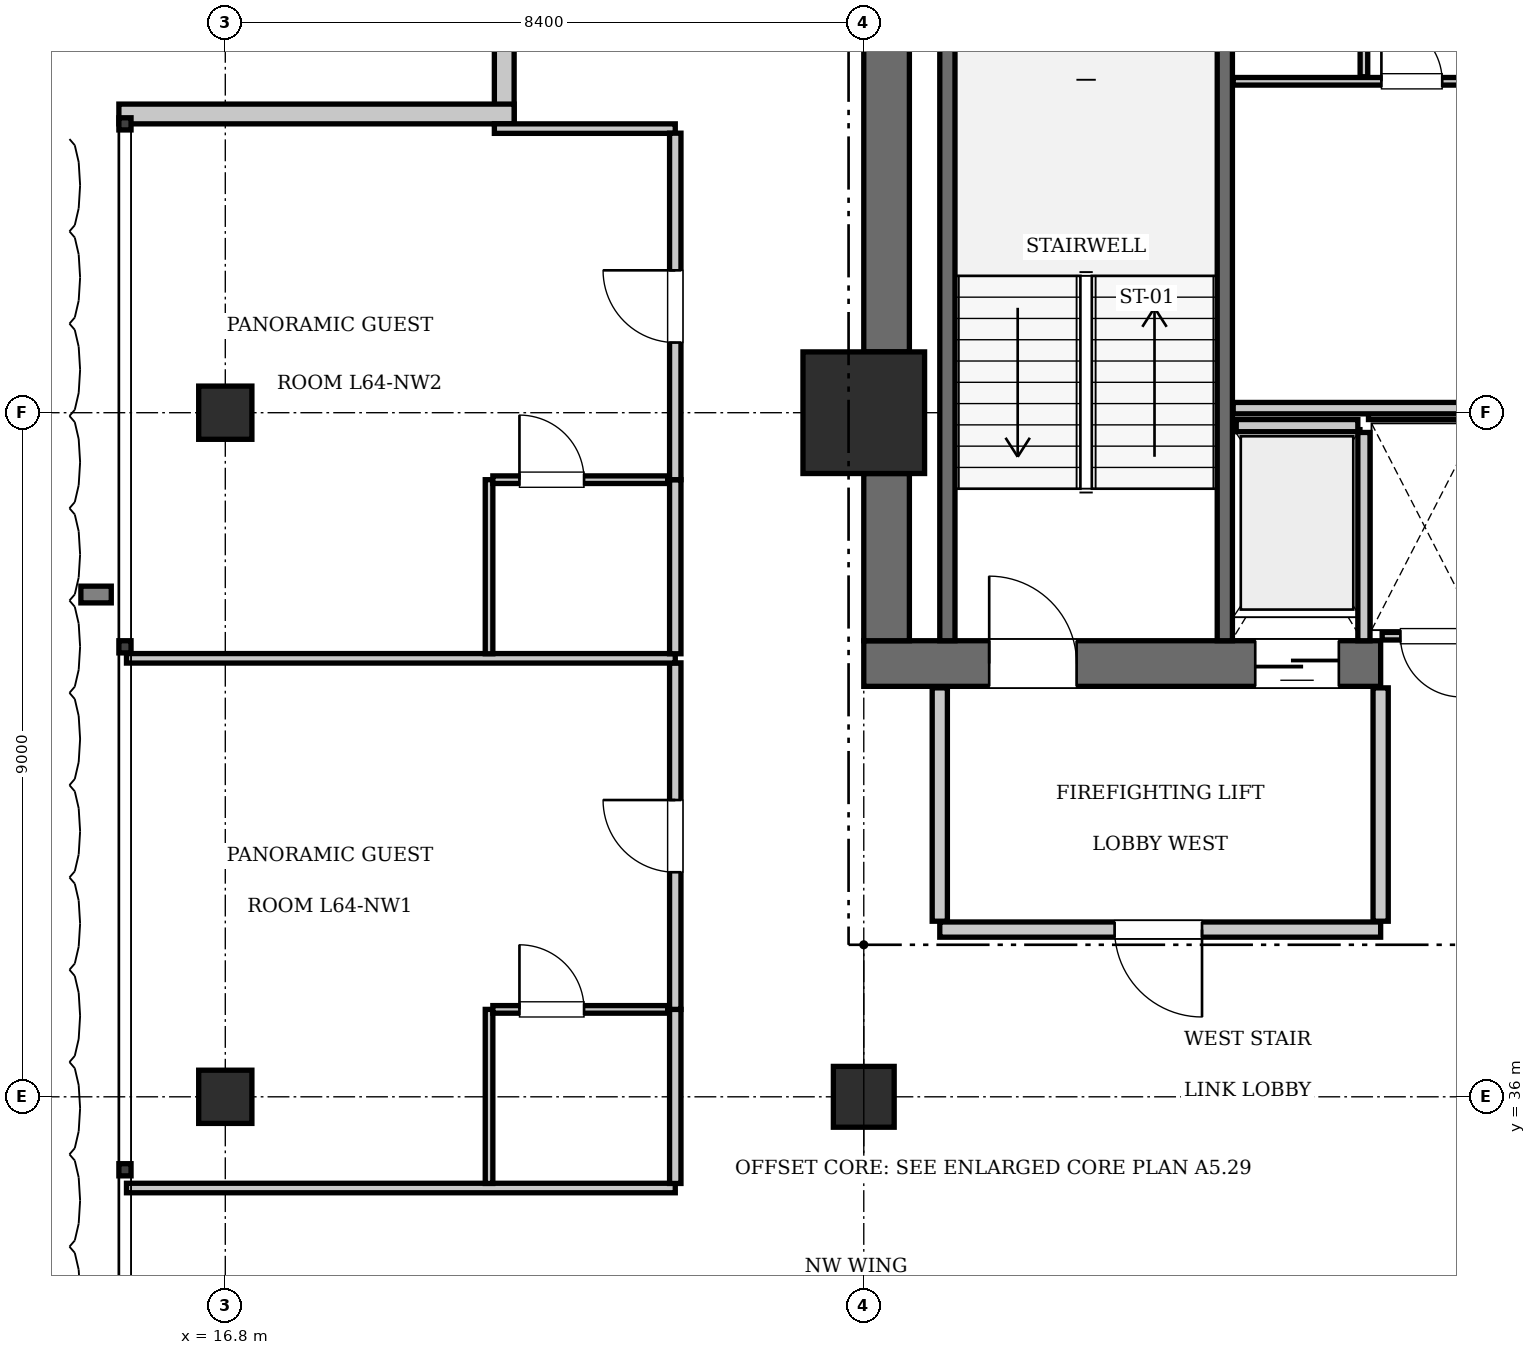
"""IFC4 building model, lengths in metres.
Left out: names, types, materials, properties, quantities, classifications, styles, units other than length and angle.
Written with IfcOpenShell. Run it as: python <this file> out.ifc"""

import sys

from ifc_helpers import new_model, si_unit, direction, frame, frame_2d, origin, origin_2d, place, context, subcontext, project, spatial, rectangle, extrude, element, fill, save


model = new_model("IFC4")
c1 = context("Model", 3, precision=1e-05, world=origin(), true_north=direction((0.0, 1.0)))
c2 = subcontext(c1, "Body", "Model", "MODEL_VIEW")
j1 = project(units=[si_unit("LENGTHUNIT", "METRE"), si_unit("PLANEANGLEUNIT", "RADIAN")], contexts=[c1])
p1 = place(None, origin())
s1 = spatial("IfcSite", under=j1, at=p1, CompositionType="ELEMENT")
p2 = place(p1, origin())
s2 = spatial("IfcBuilding", under=s1, at=p2, CompositionType="ELEMENT")
p3 = place(p2, frame((0.0, 0.0, 262.5)))
s3 = spatial("IfcBuildingStorey", under=s2, at=p3, CompositionType="ELEMENT", Elevation=262.5)
p4 = place(p3, frame((25.2, 45.0, 0.0), z_axis=(0.0, 0.0, 1.0), x_axis=(1.0, 0.0, 0.0)))
e1 = element("IfcColumn", 1, at=p4, inside=s3, PredefinedType="COLUMN", context=c2, shape_type="SweptSolid", body=[
    extrude(rectangle(XDim=1.6, YDim=1.6, at=origin_2d()), origin(), (0.0, 0.0, 1.0), 3.85),
])
p5 = place(p3, frame((25.2, 41.7, 0.0), z_axis=(0.0, 0.0, 1.0), x_axis=(1.0, 0.0, 0.0)))
e2 = element("IfcWall", 2, at=p5, inside=s3, PredefinedType="SHEAR", context=c2, shape_type="SweptSolid", body=[
    extrude(rectangle(XDim=6.8, YDim=0.6, at=frame_2d((3.4, 0.0))), origin(), (0.0, 0.0, 1.0), 3.85),
])
p6 = place(p5, frame((1.65, 0.0, 0.0)))
e3 = element("IfcOpeningElement", 3, at=p6, cuts=e2, PredefinedType="OPENING", context=c2, shape_type="SweptSolid", body=[
    extrude(rectangle(XDim=1.15, YDim=2.15, at=frame_2d((0.575, 1.075))), frame((0.0, 0.31, 0.0), z_axis=(0.0, -1.0, 0.0), x_axis=(1.0, 0.0, 0.0)), (0.0, 0.0, 1.0), 0.62),
])
p7 = place(p5, frame((5.15, 0.0, 0.0)))
e4 = element("IfcOpeningElement", 4, at=p7, cuts=e2, PredefinedType="OPENING", context=c2, shape_type="SweptSolid", body=[
    extrude(rectangle(XDim=1.1, YDim=2.2, at=frame_2d((0.55, 1.1))), frame((0.0, 0.31, 0.0), z_axis=(0.0, -1.0, 0.0), x_axis=(1.0, 0.0, 0.0)), (0.0, 0.0, 1.0), 0.62),
])
p8 = place(p3, frame((25.5, 42.0, 0.0), z_axis=(0.0, 0.0, 1.0), x_axis=(0.0, 1.0, 0.0)))
e5 = element("IfcWall", 5, at=p8, inside=s3, PredefinedType="SHEAR", context=c2, shape_type="SweptSolid", body=[
    extrude(rectangle(XDim=2.2, YDim=0.6, at=frame_2d((1.1, 0.0))), origin(), (0.0, 0.0, 1.0), 3.85),
])
p9 = place(p3, frame((25.5, 45.8, 0.0), z_axis=(0.0, 0.0, 1.0), x_axis=(0.0, 1.0, 0.0)))
e6 = element("IfcWall", 6, at=p9, inside=s3, PredefinedType="SHEAR", context=c2, shape_type="SweptSolid", body=[
    extrude(rectangle(XDim=7.6, YDim=0.6, at=frame_2d((3.8, 0.0))), origin(), (0.0, 0.0, 1.0), 3.85),
])
p10 = place(p3, frame((25.2, 36.0, 0.0), z_axis=(0.0, 0.0, 1.0), x_axis=(1.0, 0.0, 0.0)))
e7 = element("IfcColumn", 7, at=p10, inside=s3, PredefinedType="COLUMN", context=c2, shape_type="SweptSolid", body=[
    extrude(rectangle(XDim=0.8, YDim=0.8, at=origin_2d()), origin(), (0.0, 0.0, 1.0), 3.85),
])
for number, where, z_axis, x_axis in (
    (8, (16.8, 36.0, 0.0), (0.0, 0.0, 1.0), (1.0, 0.0, 0.0)),
    (9, (16.8, 45.0, 0.0), (0.0, 0.0, 1.0), (1.0, 0.0, 0.0)),
):
    element("IfcColumn", number, at=place(p3, frame(where, z_axis=z_axis, x_axis=x_axis)), inside=s3, PredefinedType="COLUMN", context=c2, shape_type="SweptSolid", body=[
        extrude(rectangle(XDim=0.7, YDim=0.7, at=origin_2d()), origin(), (0.0, 0.0, 1.0), 3.85),
    ])
p11 = place(p3, frame((29.95, 42.0, 0.0), z_axis=(0.0, 0.0, 1.0), x_axis=(0.0, 1.0, 0.0)))
e10 = element("IfcWall", 10, at=p11, inside=s3, PredefinedType="SOLIDWALL", context=c2, shape_type="SweptSolid", body=[
    extrude(rectangle(XDim=9.15, YDim=0.2, at=frame_2d((4.575, 0.0))), origin(), (0.0, 0.0, 1.0), 3.61),
])
p12 = place(p3, frame((26.3, 42.0, 0.0), z_axis=(0.0, 0.0, 1.0), x_axis=(0.0, 1.0, 0.0)))
e11 = element("IfcWall", 11, at=p12, inside=s3, PredefinedType="SOLIDWALL", context=c2, shape_type="SweptSolid", body=[
    extrude(rectangle(XDim=9.12, YDim=0.2, at=frame_2d((4.56, 0.0))), origin(), (0.0, 0.0, 1.0), 3.61),
])
p13 = place(p3, frame((30.1, 44.83, 0.0), z_axis=(0.0, 0.0, 1.0), x_axis=(1.0, 0.0, 0.0)))
e12 = element("IfcWall", 12, at=p13, inside=s3, PredefinedType="SOLIDWALL", context=c2, shape_type="SweptSolid", body=[
    extrude(rectangle(XDim=1.6, YDim=0.16, at=frame_2d((0.8, 0.0))), origin(), (0.0, 0.0, 1.0), 3.61),
])
p14 = place(p3, frame((31.78, 42.0, 0.0), z_axis=(0.0, 0.0, 1.0), x_axis=(0.0, 1.0, 0.0)))
e13 = element("IfcWall", 13, at=p14, inside=s3, PredefinedType="SOLIDWALL", context=c2, shape_type="SweptSolid", body=[
    extrude(rectangle(XDim=2.74, YDim=0.16, at=frame_2d((1.37, 0.0))), origin(), (0.0, 0.0, 1.0), 3.61),
])
p15 = place(p3, frame((20.47, 48.8, 0.0), z_axis=(0.0, 0.0, 1.0), x_axis=(0.0, 1.0, 0.0)))
e14 = element("IfcWall", 14, at=p15, inside=s3, PredefinedType="SOLIDWALL", context=c2, shape_type="SweptSolid", body=[
    extrude(rectangle(XDim=5.2, YDim=0.26, at=frame_2d((2.6, 0.0))), origin(), (0.0, 0.0, 1.0), 3.61),
])
p16 = place(p3, frame((15.4, 48.93, 0.0), z_axis=(0.0, 0.0, 1.0), x_axis=(1.0, 0.0, 0.0)))
e15 = element("IfcWall", 15, at=p16, inside=s3, PredefinedType="SOLIDWALL", context=c2, shape_type="SweptSolid", body=[
    extrude(rectangle(XDim=5.2, YDim=0.26, at=frame_2d((2.6, 0.0))), origin(), (0.0, 0.0, 1.0), 3.61),
])
p17 = place(p3, frame((26.2, 38.2, 0.0), z_axis=(0.0, 0.0, 1.0), x_axis=(1.0, 0.0, 0.0)))
e16 = element("IfcWall", 16, at=p17, inside=s3, PredefinedType="PARTITIONING", context=c2, shape_type="SweptSolid", body=[
    extrude(rectangle(XDim=5.8, YDim=0.2, at=frame_2d((2.9, 0.0))), origin(), (0.0, 0.0, 1.0), 3.61),
])
p18 = place(p17, frame((2.3, 0.0, 0.0)))
e17 = element("IfcOpeningElement", 17, at=p18, cuts=e16, PredefinedType="OPENING", context=c2, shape_type="SweptSolid", body=[
    extrude(rectangle(XDim=1.15, YDim=2.15, at=frame_2d((0.575, 1.075))), frame((0.0, 0.11, 0.0), z_axis=(0.0, -1.0, 0.0), x_axis=(1.0, 0.0, 0.0)), (0.0, 0.0, 1.0), 0.22),
])
for number, where, z_axis, x_axis in (
    (18, (26.2, 38.31, 0.0), (0.0, 0.0, 1.0), (0.0, 1.0, 0.0)),
    (19, (32.0, 38.31, 0.0), (0.0, 0.0, 1.0), (0.0, 1.0, 0.0)),
):
    element("IfcWall", number, at=place(p3, frame(where, z_axis=z_axis, x_axis=x_axis)), inside=s3, PredefinedType="PARTITIONING", context=c2, shape_type="SweptSolid", body=[
        extrude(rectangle(XDim=3.07, YDim=0.2, at=frame_2d((1.535, 0.0))), origin(), (0.0, 0.0, 1.0), 3.61),
    ])
p19 = place(p3, frame((32.02, 42.06, 0.0), z_axis=(0.0, 0.0, 1.0), x_axis=(1.0, 0.0, 0.0)))
e20 = element("IfcWall", 20, at=p19, inside=s3, PredefinedType="PARTITIONING", context=c2, shape_type="SweptSolid", body=[
    extrude(rectangle(XDim=1.32, YDim=0.1, at=frame_2d((0.66, 0.0))), origin(), (0.0, 0.0, 1.0), 3.61),
])
p20 = place(p19, frame((0.24, 0.0, 0.0)))
e21 = element("IfcOpeningElement", 21, at=p20, cuts=e20, PredefinedType="OPENING", context=c2, shape_type="SweptSolid", body=[
    extrude(rectangle(XDim=0.8, YDim=2.05, at=frame_2d((0.4, 1.025))), frame((0.0, 0.06, 0.0), z_axis=(0.0, -1.0, 0.0), x_axis=(1.0, 0.0, 0.0)), (0.0, 0.0, 1.0), 0.12),
])
p21 = place(p3, frame((31.84, 44.96, 0.0), z_axis=(0.0, 0.0, 1.0), x_axis=(1.0, 0.0, 0.0)))
e22 = element("IfcWall", 22, at=p21, inside=s3, PredefinedType="PARTITIONING", context=c2, shape_type="SweptSolid", body=[
    extrude(rectangle(XDim=1.48, YDim=0.1, at=frame_2d((0.74, 0.0))), origin(), (0.0, 0.0, 1.0), 3.61),
])
p22 = place(p3, frame((30.06, 45.06, 0.0), z_axis=(0.0, 0.0, 1.0), x_axis=(1.0, 0.0, 0.0)))
e23 = element("IfcWall", 23, at=p22, inside=s3, PredefinedType="PARTITIONING", context=c2, shape_type="SweptSolid", body=[
    extrude(rectangle(XDim=3.18, YDim=0.15, at=frame_2d((1.59, 0.0))), origin(), (0.0, 0.0, 1.0), 3.61),
])
p23 = place(p3, frame((30.06, 49.36, 0.0), z_axis=(0.0, 0.0, 1.0), x_axis=(1.0, 0.0, 0.0)))
e24 = element("IfcWall", 24, at=p23, inside=s3, PredefinedType="PARTITIONING", context=c2, shape_type="SweptSolid", body=[
    extrude(rectangle(XDim=3.18, YDim=0.1, at=frame_2d((1.59, 0.0))), origin(), (0.0, 0.0, 1.0), 3.61),
])
p24 = place(p23, frame((1.95, 0.0, 0.0)))
e25 = element("IfcOpeningElement", 25, at=p24, cuts=e24, PredefinedType="OPENING", context=c2, shape_type="SweptSolid", body=[
    extrude(rectangle(XDim=0.8, YDim=2.05, at=frame_2d((0.4, 1.025))), frame((0.0, 0.06, 0.0), z_axis=(0.0, -1.0, 0.0), x_axis=(1.0, 0.0, 0.0)), (0.0, 0.0, 1.0), 0.12),
])
p25 = place(p3, frame((31.78, 49.42, 0.0), z_axis=(0.0, 0.0, 1.0), x_axis=(0.0, 1.0, 0.0)))
e26 = element("IfcWall", 26, at=p25, inside=s3, PredefinedType="PARTITIONING", context=c2, shape_type="SweptSolid", body=[
    extrude(rectangle(XDim=1.68, YDim=0.1, at=frame_2d((0.84, 0.0))), origin(), (0.0, 0.0, 1.0), 3.61),
])
p26 = place(p25, frame((0.35, 0.0, 0.0)))
e27 = element("IfcOpeningElement", 27, at=p26, cuts=e26, PredefinedType="OPENING", context=c2, shape_type="SweptSolid", body=[
    extrude(rectangle(XDim=0.8, YDim=2.05, at=frame_2d((0.4, 1.025))), frame((0.0, 0.06, 0.0), z_axis=(0.0, -1.0, 0.0), x_axis=(1.0, 0.0, 0.0)), (0.0, 0.0, 1.0), 0.12),
])
p27 = place(p3, frame((15.5, 34.8, 0.0), z_axis=(0.0, 0.0, 1.0), x_axis=(1.0, 0.0, 0.0)))
e28 = element("IfcWall", 28, at=p27, inside=s3, PredefinedType="PARTITIONING", context=c2, shape_type="SweptSolid", body=[
    extrude(rectangle(XDim=7.22, YDim=0.125, at=frame_2d((3.61, 0.0))), origin(), (0.0, 0.0, 1.0), 3.61),
])
p28 = place(p3, frame((20.34, 48.738, 0.0), z_axis=(0.0, 0.0, 1.0), x_axis=(1.0, 0.0, 0.0)))
e29 = element("IfcWall", 29, at=p28, inside=s3, PredefinedType="PARTITIONING", context=c2, shape_type="SweptSolid", body=[
    extrude(rectangle(XDim=2.38, YDim=0.125, at=frame_2d((1.19, 0.0))), origin(), (0.0, 0.0, 1.0), 3.61),
])
p29 = place(p3, frame((22.72, 34.86, 0.0), z_axis=(0.0, 0.0, 1.0), x_axis=(0.0, 1.0, 0.0)))
e30 = element("IfcWall", 30, at=p29, inside=s3, PredefinedType="PARTITIONING", context=c2, shape_type="SweptSolid", body=[
    extrude(rectangle(XDim=2.29, YDim=0.15, at=frame_2d((1.145, 0.0))), origin(), (0.0, 0.0, 1.0), 3.61),
])
p30 = place(p3, frame((22.72, 37.15, 0.0), z_axis=(0.0, 0.0, 1.0), x_axis=(0.0, 1.0, 0.0)))
e31 = element("IfcWall", 31, at=p30, inside=s3, PredefinedType="PARTITIONING", context=c2, shape_type="SweptSolid", body=[
    extrude(rectangle(XDim=4.559, YDim=0.15, at=frame_2d((2.279, 0.0))), origin(), (0.0, 0.0, 1.0), 3.61),
])
p31 = place(p30, frame((1.804, 0.0, 0.0)))
e32 = element("IfcOpeningElement", 32, at=p31, cuts=e31, PredefinedType="OPENING", context=c2, shape_type="SweptSolid", body=[
    extrude(rectangle(XDim=0.95, YDim=2.15, at=frame_2d((0.475, 1.075))), frame((0.0, 0.085, 0.0), z_axis=(0.0, -1.0, 0.0), x_axis=(1.0, 0.0, 0.0)), (0.0, 0.0, 1.0), 0.17),
])
p32 = place(p3, frame((20.27, 34.86, 0.0), z_axis=(0.0, 0.0, 1.0), x_axis=(0.0, 1.0, 0.0)))
e33 = element("IfcWall", 33, at=p32, inside=s3, PredefinedType="PARTITIONING", context=c2, shape_type="SweptSolid", body=[
    extrude(rectangle(XDim=2.29, YDim=0.1, at=frame_2d((1.145, 0.0))), origin(), (0.0, 0.0, 1.0), 3.61),
])
p33 = place(p3, frame((20.32, 37.15, 0.0), z_axis=(0.0, 0.0, 1.0), x_axis=(1.0, 0.0, 0.0)))
e34 = element("IfcWall", 34, at=p33, inside=s3, PredefinedType="PARTITIONING", context=c2, shape_type="SweptSolid", body=[
    extrude(rectangle(XDim=2.3, YDim=0.1, at=frame_2d((1.15, 0.0))), origin(), (0.0, 0.0, 1.0), 3.61),
])
p34 = place(p33, frame((0.35, 0.0, 0.0)))
e35 = element("IfcOpeningElement", 35, at=p34, cuts=e34, PredefinedType="OPENING", context=c2, shape_type="SweptSolid", body=[
    extrude(rectangle(XDim=0.85, YDim=2.1, at=frame_2d((0.425, 1.05))), frame((0.0, 0.06, 0.0), z_axis=(0.0, -1.0, 0.0), x_axis=(1.0, 0.0, 0.0)), (0.0, 0.0, 1.0), 0.12),
])
p35 = place(p3, frame((15.5, 41.769, 0.0), z_axis=(0.0, 0.0, 1.0), x_axis=(1.0, 0.0, 0.0)))
e36 = element("IfcWall", 36, at=p35, inside=s3, PredefinedType="PARTITIONING", context=c2, shape_type="SweptSolid", body=[
    extrude(rectangle(XDim=7.22, YDim=0.125, at=frame_2d((3.61, 0.0))), origin(), (0.0, 0.0, 1.0), 3.61),
])
p36 = place(p3, frame((22.72, 41.829, 0.0), z_axis=(0.0, 0.0, 1.0), x_axis=(0.0, 1.0, 0.0)))
e37 = element("IfcWall", 37, at=p36, inside=s3, PredefinedType="PARTITIONING", context=c2, shape_type="SweptSolid", body=[
    extrude(rectangle(XDim=2.29, YDim=0.15, at=frame_2d((1.145, 0.0))), origin(), (0.0, 0.0, 1.0), 3.61),
])
p37 = place(p3, frame((22.72, 44.119, 0.0), z_axis=(0.0, 0.0, 1.0), x_axis=(0.0, 1.0, 0.0)))
e38 = element("IfcWall", 38, at=p37, inside=s3, PredefinedType="PARTITIONING", context=c2, shape_type="SweptSolid", body=[
    extrude(rectangle(XDim=4.559, YDim=0.15, at=frame_2d((2.279, 0.0))), origin(), (0.0, 0.0, 1.0), 3.61),
])
p38 = place(p37, frame((1.804, 0.0, 0.0)))
e39 = element("IfcOpeningElement", 39, at=p38, cuts=e38, PredefinedType="OPENING", context=c2, shape_type="SweptSolid", body=[
    extrude(rectangle(XDim=0.95, YDim=2.15, at=frame_2d((0.475, 1.075))), frame((0.0, 0.085, 0.0), z_axis=(0.0, -1.0, 0.0), x_axis=(1.0, 0.0, 0.0)), (0.0, 0.0, 1.0), 0.17),
])
p39 = place(p3, frame((20.27, 41.829, 0.0), z_axis=(0.0, 0.0, 1.0), x_axis=(0.0, 1.0, 0.0)))
e40 = element("IfcWall", 40, at=p39, inside=s3, PredefinedType="PARTITIONING", context=c2, shape_type="SweptSolid", body=[
    extrude(rectangle(XDim=2.29, YDim=0.1, at=frame_2d((1.145, 0.0))), origin(), (0.0, 0.0, 1.0), 3.61),
])
p40 = place(p3, frame((20.32, 44.119, 0.0), z_axis=(0.0, 0.0, 1.0), x_axis=(1.0, 0.0, 0.0)))
e41 = element("IfcWall", 41, at=p40, inside=s3, PredefinedType="PARTITIONING", context=c2, shape_type="SweptSolid", body=[
    extrude(rectangle(XDim=2.3, YDim=0.1, at=frame_2d((1.15, 0.0))), origin(), (0.0, 0.0, 1.0), 3.61),
])
p41 = place(p40, frame((0.35, 0.0, 0.0)))
e42 = element("IfcOpeningElement", 42, at=p41, cuts=e41, PredefinedType="OPENING", context=c2, shape_type="SweptSolid", body=[
    extrude(rectangle(XDim=0.85, YDim=2.1, at=frame_2d((0.425, 1.05))), frame((0.0, 0.06, 0.0), z_axis=(0.0, -1.0, 0.0), x_axis=(1.0, 0.0, 0.0)), (0.0, 0.0, 1.0), 0.12),
])
p42 = place(p6, origin())
e43 = element("IfcDoor", 43, at=p42, inside=s3, OperationType="SINGLE_SWING_LEFT", PredefinedType="DOOR", context=c2, shape_type="SweptSolid", body=[
    extrude(rectangle(XDim=1.15, YDim=2.15, at=frame_2d((0.575, 1.075))), frame((0.0, 0.025, 0.0), z_axis=(0.0, -1.0, 0.0), x_axis=(1.0, 0.0, 0.0)), (0.0, 0.0, 1.0), 0.05),
])
fill(e3, e43)
p43 = place(p7, frame((1.1, 0.0, 0.0), z_axis=(0.0, 0.0, 1.0), x_axis=(-1.0, 0.0, 0.0)))
e44 = element("IfcDoor", 44, at=p43, inside=s3, OperationType="SLIDING_TO_LEFT", PredefinedType="DOOR", context=c2, shape_type="SweptSolid", body=[
    extrude(rectangle(XDim=1.1, YDim=2.2, at=frame_2d((0.55, 1.1))), frame((0.0, 0.025, 0.0), z_axis=(0.0, -1.0, 0.0), x_axis=(1.0, 0.0, 0.0)), (0.0, 0.0, 1.0), 0.05),
])
fill(e4, e44)
p44 = place(p18, frame((1.15, 0.0, 0.0), z_axis=(0.0, 0.0, 1.0), x_axis=(-1.0, 0.0, 0.0)))
e45 = element("IfcDoor", 45, at=p44, inside=s3, OperationType="SINGLE_SWING_LEFT", PredefinedType="DOOR", context=c2, shape_type="SweptSolid", body=[
    extrude(rectangle(XDim=1.15, YDim=2.15, at=frame_2d((0.575, 1.075))), frame((0.0, 0.025, 0.0), z_axis=(0.0, -1.0, 0.0), x_axis=(1.0, 0.0, 0.0)), (0.0, 0.0, 1.0), 0.05),
])
fill(e17, e45)
p45 = place(p20, frame((0.8, 0.0, 0.0), z_axis=(0.0, 0.0, 1.0), x_axis=(-1.0, 0.0, 0.0)))
e46 = element("IfcDoor", 46, at=p45, inside=s3, OperationType="SINGLE_SWING_LEFT", PredefinedType="DOOR", context=c2, shape_type="SweptSolid", body=[
    extrude(rectangle(XDim=0.8, YDim=2.05, at=frame_2d((0.4, 1.025))), frame((0.0, 0.025, 0.0), z_axis=(0.0, -1.0, 0.0), x_axis=(1.0, 0.0, 0.0)), (0.0, 0.0, 1.0), 0.05),
])
fill(e21, e46)
p46 = place(p24, origin())
e47 = element("IfcDoor", 47, at=p46, inside=s3, OperationType="SINGLE_SWING_LEFT", PredefinedType="DOOR", context=c2, shape_type="SweptSolid", body=[
    extrude(rectangle(XDim=0.8, YDim=2.05, at=frame_2d((0.4, 1.025))), frame((0.0, 0.025, 0.0), z_axis=(0.0, -1.0, 0.0), x_axis=(1.0, 0.0, 0.0)), (0.0, 0.0, 1.0), 0.05),
])
fill(e25, e47)
p47 = place(p34, origin())
e48 = element("IfcDoor", 48, at=p47, inside=s3, OperationType="SINGLE_SWING_LEFT", PredefinedType="DOOR", context=c2, shape_type="SweptSolid", body=[
    extrude(rectangle(XDim=0.85, YDim=2.1, at=frame_2d((0.425, 1.05))), frame((0.0, 0.025, 0.0), z_axis=(0.0, -1.0, 0.0), x_axis=(1.0, 0.0, 0.0)), (0.0, 0.0, 1.0), 0.05),
])
fill(e35, e48)
p48 = place(p31, origin())
e49 = element("IfcDoor", 49, at=p48, inside=s3, OperationType="SINGLE_SWING_RIGHT", PredefinedType="DOOR", context=c2, shape_type="SweptSolid", body=[
    extrude(rectangle(XDim=0.95, YDim=2.15, at=frame_2d((0.475, 1.075))), frame((0.0, 0.025, 0.0), z_axis=(0.0, -1.0, 0.0), x_axis=(1.0, 0.0, 0.0)), (0.0, 0.0, 1.0), 0.05),
])
fill(e32, e49)
p49 = place(p41, origin())
e50 = element("IfcDoor", 50, at=p49, inside=s3, OperationType="SINGLE_SWING_LEFT", PredefinedType="DOOR", context=c2, shape_type="SweptSolid", body=[
    extrude(rectangle(XDim=0.85, YDim=2.1, at=frame_2d((0.425, 1.05))), frame((0.0, 0.025, 0.0), z_axis=(0.0, -1.0, 0.0), x_axis=(1.0, 0.0, 0.0)), (0.0, 0.0, 1.0), 0.05),
])
fill(e42, e50)
p50 = place(p38, origin())
e51 = element("IfcDoor", 51, at=p50, inside=s3, OperationType="SINGLE_SWING_RIGHT", PredefinedType="DOOR", context=c2, shape_type="SweptSolid", body=[
    extrude(rectangle(XDim=0.95, YDim=2.15, at=frame_2d((0.475, 1.075))), frame((0.0, 0.025, 0.0), z_axis=(0.0, -1.0, 0.0), x_axis=(1.0, 0.0, 0.0)), (0.0, 0.0, 1.0), 0.05),
])
fill(e39, e51)
save(model, sys.argv[1])
